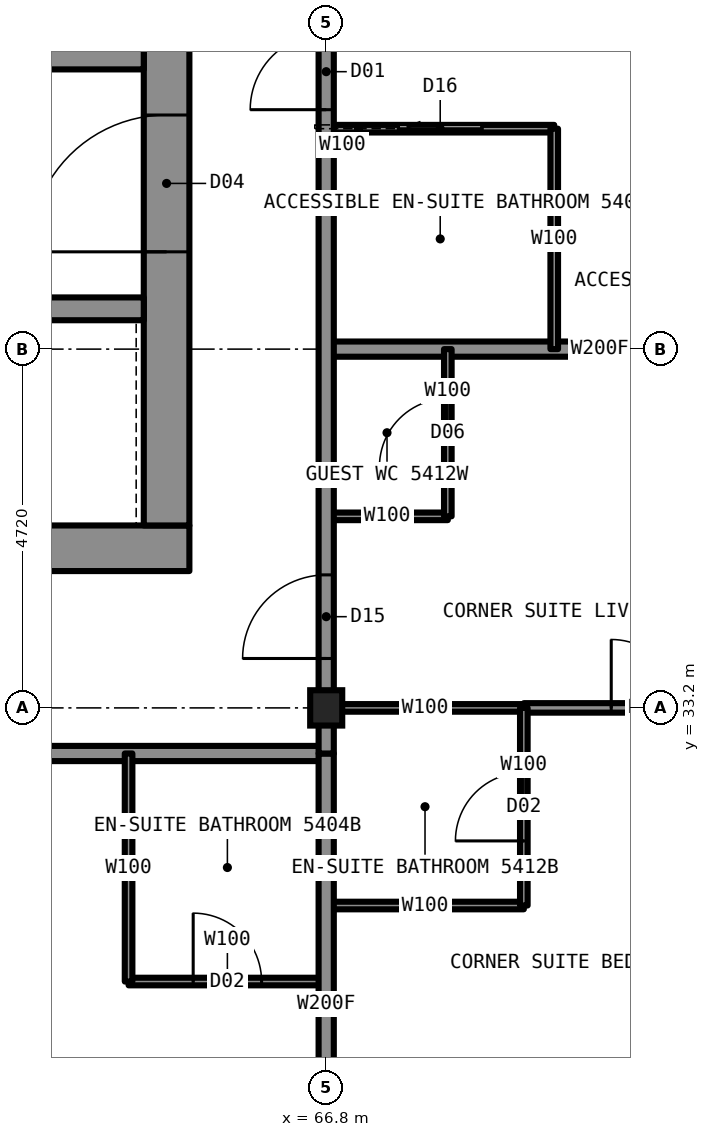
"""IFC4 building model, lengths in metres.
Left out: names, types, materials, properties, quantities, classifications, styles, units other than length and angle.
Written with IfcOpenShell. Run it as: python <this file> out.ifc"""

import sys

from ifc_helpers import new_model, si_unit, direction, frame, frame_2d, origin, origin_2d, place, context, subcontext, project, spatial, rectangle, i_section, extrude, element, fill, save


model = new_model("IFC4")
c1 = context("Model", 3, precision=1e-05, world=origin(), true_north=direction((0.0, 1.0)))
c2 = subcontext(c1, "Body", "Model", "MODEL_VIEW")
j1 = project(units=[si_unit("LENGTHUNIT", "METRE"), si_unit("PLANEANGLEUNIT", "RADIAN")], contexts=[c1])
p1 = place(None, origin())
s1 = spatial("IfcSite", under=j1, at=p1, CompositionType="ELEMENT")
p2 = place(p1, origin())
s2 = spatial("IfcBuilding", under=s1, at=p2, CompositionType="ELEMENT")
p3 = place(p2, frame((0.0, 0.0, 193.3)))
s3 = spatial("IfcBuildingStorey", under=s2, at=p3, CompositionType="ELEMENT", Elevation=193.3)
p4 = place(p3, frame((66.8, 33.2, 0.0), z_axis=(0.0, 0.0, 1.0), x_axis=(1.0, 0.0, 0.0)))
e1 = element("IfcColumn", 1, at=p4, inside=s3, PredefinedType="COLUMN", context=c2, shape_type="SweptSolid", body=[
    extrude(i_section(OverallWidth=0.422, OverallDepth=0.465, WebThickness=0.045, FlangeThickness=0.073, at=origin_2d()), origin(), (0.0, 0.0, 1.0), 3.5),
])
p5 = place(p3, frame((45.0, 35.3, 0.0), z_axis=(0.0, 0.0, 1.0), x_axis=(1.0, 0.0, 0.0)))
e2 = element("IfcWall", 2, at=p5, inside=s3, PredefinedType="SHEAR", context=c2, shape_type="SweptSolid", body=[
    extrude(rectangle(XDim=20.0, YDim=0.6, at=frame_2d((10.0, 0.0))), origin(), (0.0, 0.0, 1.0), 3.5),
])
p6 = place(p3, frame((64.7, 35.6, 0.0), z_axis=(0.0, 0.0, 1.0), x_axis=(0.0, 1.0, 0.0)))
e3 = element("IfcWall", 3, at=p6, inside=s3, PredefinedType="SHEAR", context=c2, shape_type="SweptSolid", body=[
    extrude(rectangle(XDim=18.8, YDim=0.6, at=frame_2d((9.4, 0.0))), origin(), (0.0, 0.0, 1.0), 3.5),
])
p7 = place(p6, frame((13.4, 0.0, 0.0)))
e4 = element("IfcOpeningElement", 4, at=p7, cuts=e3, PredefinedType="OPENING", context=c2, shape_type="SweptSolid", body=[
    extrude(rectangle(XDim=1.8, YDim=2.2, at=frame_2d((0.9, 1.1))), frame((0.0, 0.31, 0.0), z_axis=(0.0, -1.0, 0.0), x_axis=(1.0, 0.0, 0.0)), (0.0, 0.0, 1.0), 0.62),
])
p8 = place(p6, frame((3.6, 0.0, 0.0)))
e5 = element("IfcOpeningElement", 5, at=p8, cuts=e3, PredefinedType="OPENING", context=c2, shape_type="SweptSolid", body=[
    extrude(rectangle(XDim=1.8, YDim=2.2, at=frame_2d((0.9, 1.1))), frame((0.0, 0.31, 0.0), z_axis=(0.0, -1.0, 0.0), x_axis=(1.0, 0.0, 0.0)), (0.0, 0.0, 1.0), 0.62),
])
p9 = place(p3, frame((45.6, 38.45, 0.0), z_axis=(0.0, 0.0, 1.0), x_axis=(1.0, 0.0, 0.0)))
e6 = element("IfcWall", 6, at=p9, inside=s3, PredefinedType="SHEAR", context=c2, shape_type="SweptSolid", body=[
    extrude(rectangle(XDim=18.8, YDim=0.3, at=frame_2d((9.4, 0.0))), origin(), (0.0, 0.0, 1.0), 3.5),
])
p10 = place(p9, frame((0.7, 0.0, 0.0)))
e7 = element("IfcOpeningElement", 7, at=p10, cuts=e6, PredefinedType="OPENING", context=c2, shape_type="SweptSolid", body=[
    extrude(rectangle(XDim=1.1, YDim=2.2, at=frame_2d((0.55, 1.1))), frame((0.0, 0.16, 0.0), z_axis=(0.0, -1.0, 0.0), x_axis=(1.0, 0.0, 0.0)), (0.0, 0.0, 1.0), 0.32),
])
p11 = place(p9, frame((3.4, 0.0, 0.0)))
e8 = element("IfcOpeningElement", 8, at=p11, cuts=e6, PredefinedType="OPENING", context=c2, shape_type="SweptSolid", body=[
    extrude(rectangle(XDim=1.1, YDim=2.2, at=frame_2d((0.55, 1.1))), frame((0.0, 0.16, 0.0), z_axis=(0.0, -1.0, 0.0), x_axis=(1.0, 0.0, 0.0)), (0.0, 0.0, 1.0), 0.32),
])
p12 = place(p9, frame((6.1, 0.0, 0.0)))
e9 = element("IfcOpeningElement", 9, at=p12, cuts=e6, PredefinedType="OPENING", context=c2, shape_type="SweptSolid", body=[
    extrude(rectangle(XDim=1.1, YDim=2.2, at=frame_2d((0.55, 1.1))), frame((0.0, 0.16, 0.0), z_axis=(0.0, -1.0, 0.0), x_axis=(1.0, 0.0, 0.0)), (0.0, 0.0, 1.0), 0.32),
])
p13 = place(p9, frame((8.8, 0.0, 0.0)))
e10 = element("IfcOpeningElement", 10, at=p13, cuts=e6, PredefinedType="OPENING", context=c2, shape_type="SweptSolid", body=[
    extrude(rectangle(XDim=1.1, YDim=2.2, at=frame_2d((0.55, 1.1))), frame((0.0, 0.16, 0.0), z_axis=(0.0, -1.0, 0.0), x_axis=(1.0, 0.0, 0.0)), (0.0, 0.0, 1.0), 0.32),
])
p14 = place(p3, frame((56.2, 41.75, 0.0), z_axis=(0.0, 0.0, 1.0), x_axis=(1.0, 0.0, 0.0)))
e11 = element("IfcWall", 11, at=p14, inside=s3, PredefinedType="SHEAR", context=c2, shape_type="SweptSolid", body=[
    extrude(rectangle(XDim=8.2, YDim=0.3, at=frame_2d((4.1, 0.0))), origin(), (0.0, 0.0, 1.0), 3.5),
])
p15 = place(p14, frame((3.3, 0.0, 0.0)))
e12 = element("IfcOpeningElement", 12, at=p15, cuts=e11, PredefinedType="OPENING", context=c2, shape_type="SweptSolid", body=[
    extrude(rectangle(XDim=1.0, YDim=2.1, at=frame_2d((0.5, 1.05))), frame((0.0, 0.16, 0.0), z_axis=(0.0, -1.0, 0.0), x_axis=(1.0, 0.0, 0.0)), (0.0, 0.0, 1.0), 0.32),
])
p16 = place(p3, frame((66.8, 33.2, 0.0), z_axis=(0.0, 0.0, 1.0), x_axis=(1.0, 0.0, 0.0)))
e13 = element("IfcWall", 13, at=p16, inside=s3, PredefinedType="PARTITIONING", context=c2, shape_type="SweptSolid", body=[
    extrude(rectangle(XDim=2.6, YDim=0.1, at=frame_2d((1.3, 0.0))), origin(), (0.0, 0.0, 1.0), 2.573),
])
p17 = place(p3, frame((69.4, 33.2, 0.0), z_axis=(0.0, 0.0, 1.0), x_axis=(1.0, 0.0, 0.0)))
e14 = element("IfcWall", 14, at=p17, inside=s3, PredefinedType="PARTITIONING", context=c2, shape_type="SweptSolid", body=[
    extrude(rectangle(XDim=4.6, YDim=0.125, at=frame_2d((2.3, 0.0))), origin(), (0.0, 0.0, 1.0), 2.573),
])
p18 = place(p17, frame((1.15, 0.0, 0.0)))
e15 = element("IfcOpeningElement", 15, at=p18, cuts=e14, PredefinedType="OPENING", context=c2, shape_type="SweptSolid", body=[
    extrude(rectangle(XDim=0.9, YDim=2.2, at=frame_2d((0.45, 1.1))), frame((0.0, 0.073, 0.0), z_axis=(0.0, -1.0, 0.0), x_axis=(1.0, 0.0, 0.0)), (0.0, 0.0, 1.0), 0.145),
])
p19 = place(p3, frame((43.2, 32.6, 0.0), z_axis=(0.0, 0.0, 1.0), x_axis=(1.0, 0.0, 0.0)))
e16 = element("IfcWall", 16, at=p19, inside=s3, PredefinedType="PARTITIONING", context=c2, shape_type="SweptSolid", body=[
    extrude(rectangle(XDim=23.6, YDim=0.2, at=frame_2d((11.8, 0.0))), origin(), (0.0, 0.0, 1.0), 3.33),
])
p20 = place(p19, frame((3.0, 0.0, 0.0)))
e17 = element("IfcOpeningElement", 17, at=p20, cuts=e16, PredefinedType="OPENING", context=c2, shape_type="SweptSolid", body=[
    extrude(rectangle(XDim=1.0, YDim=2.2, at=frame_2d((0.5, 1.1))), frame((0.0, 0.11, 0.0), z_axis=(0.0, -1.0, 0.0), x_axis=(1.0, 0.0, 0.0)), (0.0, 0.0, 1.0), 0.22),
])
p21 = place(p19, frame((11.29, 0.0, 0.0)))
e18 = element("IfcOpeningElement", 18, at=p21, cuts=e16, PredefinedType="OPENING", context=c2, shape_type="SweptSolid", body=[
    extrude(rectangle(XDim=1.1, YDim=2.2, at=frame_2d((0.55, 1.1))), frame((0.0, 0.11, 0.0), z_axis=(0.0, -1.0, 0.0), x_axis=(1.0, 0.0, 0.0)), (0.0, 0.0, 1.0), 0.22),
])
p22 = place(p3, frame((66.8, 30.6, 0.0), z_axis=(0.0, 0.0, 1.0), x_axis=(1.0, 0.0, 0.0)))
e19 = element("IfcWall", 19, at=p22, inside=s3, PredefinedType="PARTITIONING", context=c2, shape_type="SweptSolid", body=[
    extrude(rectangle(XDim=2.6, YDim=0.1, at=frame_2d((1.3, 0.0))), origin(), (0.0, 0.0, 1.0), 3.33),
])
p23 = place(p3, frame((64.2, 29.6, 0.0), z_axis=(0.0, 0.0, 1.0), x_axis=(1.0, 0.0, 0.0)))
e20 = element("IfcWall", 20, at=p23, inside=s3, PredefinedType="PARTITIONING", context=c2, shape_type="SweptSolid", body=[
    extrude(rectangle(XDim=2.6, YDim=0.1, at=frame_2d((1.3, 0.0))), origin(), (0.0, 0.0, 1.0), 3.33),
])
p24 = place(p23, frame((0.85, 0.0, 0.0)))
e21 = element("IfcOpeningElement", 21, at=p24, cuts=e20, PredefinedType="OPENING", context=c2, shape_type="SweptSolid", body=[
    extrude(rectangle(XDim=0.9, YDim=2.1, at=frame_2d((0.45, 1.05))), frame((0.0, 0.06, 0.0), z_axis=(0.0, -1.0, 0.0), x_axis=(1.0, 0.0, 0.0)), (0.0, 0.0, 1.0), 0.12),
])
p25 = place(p3, frame((66.8, 40.82, 0.0), z_axis=(0.0, 0.0, 1.0), x_axis=(1.0, 0.0, 0.0)))
e22 = element("IfcWall", 22, at=p25, inside=s3, PredefinedType="PARTITIONING", context=c2, shape_type="SweptSolid", body=[
    extrude(rectangle(XDim=3.0, YDim=0.1, at=frame_2d((1.5, 0.0))), origin(), (0.0, 0.0, 1.0), 3.33),
])
p26 = place(p25, frame((0.95, 0.0, 0.0)))
e23 = element("IfcOpeningElement", 23, at=p26, cuts=e22, PredefinedType="OPENING", context=c2, shape_type="SweptSolid", body=[
    extrude(rectangle(XDim=1.1, YDim=2.1, at=frame_2d((0.55, 1.05))), frame((0.0, 0.06, 0.0), z_axis=(0.0, -1.0, 0.0), x_axis=(1.0, 0.0, 0.0)), (0.0, 0.0, 1.0), 0.12),
])
p27 = place(p3, frame((66.8, 37.92, 0.0), z_axis=(0.0, 0.0, 1.0), x_axis=(1.0, 0.0, 0.0)))
e24 = element("IfcWall", 24, at=p27, inside=s3, PredefinedType="PARTITIONING", context=c2, shape_type="SweptSolid", body=[
    extrude(rectangle(XDim=7.2, YDim=0.2, at=frame_2d((3.6, 0.0))), origin(), (0.0, 0.0, 1.0), 2.573),
])
p28 = place(p3, frame((66.8, 35.72, 0.0), z_axis=(0.0, 0.0, 1.0), x_axis=(1.0, 0.0, 0.0)))
e25 = element("IfcWall", 25, at=p28, inside=s3, PredefinedType="PARTITIONING", context=c2, shape_type="SweptSolid", body=[
    extrude(rectangle(XDim=1.6, YDim=0.1, at=frame_2d((0.8, 0.0))), origin(), (0.0, 0.0, 1.0), 3.33),
])
p29 = place(p3, frame((66.8, 33.22, 0.0), z_axis=(0.0, 0.0, 1.0), x_axis=(0.0, 1.0, 0.0)))
e26 = element("IfcWall", 26, at=p29, inside=s3, PredefinedType="PARTITIONING", context=c2, shape_type="SweptSolid", body=[
    extrude(rectangle(XDim=23.56, YDim=0.2, at=frame_2d((11.78, 0.0))), origin(), (0.0, 0.0, 1.0), 3.33),
])
p30 = place(p29, frame((7.85, 0.0, 0.0)))
e27 = element("IfcOpeningElement", 27, at=p30, cuts=e26, PredefinedType="OPENING", context=c2, shape_type="SweptSolid", body=[
    extrude(rectangle(XDim=1.0, YDim=2.2, at=frame_2d((0.5, 1.1))), frame((0.0, 0.11, 0.0), z_axis=(0.0, -1.0, 0.0), x_axis=(1.0, 0.0, 0.0)), (0.0, 0.0, 1.0), 0.22),
])
p31 = place(p29, frame((12.42, 0.0, 0.0)))
e28 = element("IfcOpeningElement", 28, at=p31, cuts=e26, PredefinedType="OPENING", context=c2, shape_type="SweptSolid", body=[
    extrude(rectangle(XDim=1.0, YDim=2.2, at=frame_2d((0.5, 1.1))), frame((0.0, 0.11, 0.0), z_axis=(0.0, -1.0, 0.0), x_axis=(1.0, 0.0, 0.0)), (0.0, 0.0, 1.0), 0.22),
])
p32 = place(p29, frame((22.03, 0.0, 0.0)))
e29 = element("IfcOpeningElement", 29, at=p32, cuts=e26, PredefinedType="OPENING", context=c2, shape_type="SweptSolid", body=[
    extrude(rectangle(XDim=1.1, YDim=2.2, at=frame_2d((0.55, 1.1))), frame((0.0, 0.11, 0.0), z_axis=(0.0, -1.0, 0.0), x_axis=(1.0, 0.0, 0.0)), (0.0, 0.0, 1.0), 0.22),
])
p33 = place(p29, frame((0.63, 0.0, 0.0)))
e30 = element("IfcOpeningElement", 30, at=p33, cuts=e26, PredefinedType="OPENING", context=c2, shape_type="SweptSolid", body=[
    extrude(rectangle(XDim=1.1, YDim=2.2, at=frame_2d((0.55, 1.1))), frame((0.0, 0.11, 0.0), z_axis=(0.0, -1.0, 0.0), x_axis=(1.0, 0.0, 0.0)), (0.0, 0.0, 1.0), 0.22),
])
p34 = place(p3, frame((66.8, 26.0, 0.0), z_axis=(0.0, 0.0, 1.0), x_axis=(0.0, 1.0, 0.0)))
e31 = element("IfcWall", 31, at=p34, inside=s3, PredefinedType="PARTITIONING", context=c2, shape_type="SweptSolid", body=[
    extrude(rectangle(XDim=6.6, YDim=0.2, at=frame_2d((3.3, 0.0))), origin(), (0.0, 0.0, 1.0), 2.573),
])
p35 = place(p3, frame((68.4, 35.72, 0.0), z_axis=(0.0, 0.0, 1.0), x_axis=(0.0, 1.0, 0.0)))
e32 = element("IfcWall", 32, at=p35, inside=s3, PredefinedType="PARTITIONING", context=c2, shape_type="SweptSolid", body=[
    extrude(rectangle(XDim=2.2, YDim=0.1, at=frame_2d((1.1, 0.0))), origin(), (0.0, 0.0, 1.0), 3.33),
])
p36 = place(p35, frame((0.65, 0.0, 0.0)))
e33 = element("IfcOpeningElement", 33, at=p36, cuts=e32, PredefinedType="OPENING", context=c2, shape_type="SweptSolid", body=[
    extrude(rectangle(XDim=0.9, YDim=2.1, at=frame_2d((0.45, 1.05))), frame((0.0, 0.06, 0.0), z_axis=(0.0, -1.0, 0.0), x_axis=(1.0, 0.0, 0.0)), (0.0, 0.0, 1.0), 0.12),
])
p37 = place(p3, frame((69.4, 30.6, 0.0), z_axis=(0.0, 0.0, 1.0), x_axis=(0.0, 1.0, 0.0)))
e34 = element("IfcWall", 34, at=p37, inside=s3, PredefinedType="PARTITIONING", context=c2, shape_type="SweptSolid", body=[
    extrude(rectangle(XDim=2.6, YDim=0.1, at=frame_2d((1.3, 0.0))), origin(), (0.0, 0.0, 1.0), 3.33),
])
p38 = place(p37, frame((0.85, 0.0, 0.0)))
e35 = element("IfcOpeningElement", 35, at=p38, cuts=e34, PredefinedType="OPENING", context=c2, shape_type="SweptSolid", body=[
    extrude(rectangle(XDim=0.9, YDim=2.1, at=frame_2d((0.45, 1.05))), frame((0.0, 0.06, 0.0), z_axis=(0.0, -1.0, 0.0), x_axis=(1.0, 0.0, 0.0)), (0.0, 0.0, 1.0), 0.12),
])
p39 = place(p3, frame((69.8, 37.92, 0.0), z_axis=(0.0, 0.0, 1.0), x_axis=(0.0, 1.0, 0.0)))
e36 = element("IfcWall", 36, at=p39, inside=s3, PredefinedType="PARTITIONING", context=c2, shape_type="SweptSolid", body=[
    extrude(rectangle(XDim=2.9, YDim=0.1, at=frame_2d((1.45, 0.0))), origin(), (0.0, 0.0, 1.0), 3.33),
])
p40 = place(p3, frame((64.2, 29.6, 0.0), z_axis=(0.0, 0.0, 1.0), x_axis=(0.0, 1.0, 0.0)))
e37 = element("IfcWall", 37, at=p40, inside=s3, PredefinedType="PARTITIONING", context=c2, shape_type="SweptSolid", body=[
    extrude(rectangle(XDim=3.0, YDim=0.1, at=frame_2d((1.5, 0.0))), origin(), (0.0, 0.0, 1.0), 3.33),
])
p41 = place(p3, frame((66.8, 32.6, 0.0), z_axis=(0.0, 0.0, 1.0), x_axis=(0.0, 1.0, 0.0)))
e38 = element("IfcWall", 38, at=p41, inside=s3, PredefinedType="PARTITIONING", context=c2, shape_type="SweptSolid", body=[
    extrude(rectangle(XDim=0.62, YDim=0.2, at=frame_2d((0.31, 0.0))), origin(), (0.0, 0.0, 1.0), 2.573),
])
p42 = place(p24, origin())
e39 = element("IfcDoor", 39, at=p42, inside=s3, OperationType="SINGLE_SWING_RIGHT", PredefinedType="DOOR", context=c2, shape_type="SweptSolid", body=[
    extrude(rectangle(XDim=0.9, YDim=2.1, at=frame_2d((0.45, 1.05))), frame((0.0, 0.025, 0.0), z_axis=(0.0, -1.0, 0.0), x_axis=(1.0, 0.0, 0.0)), (0.0, 0.0, 1.0), 0.05),
])
fill(e21, e39)
p43 = place(p30, origin())
e40 = element("IfcDoor", 40, at=p43, inside=s3, OperationType="SINGLE_SWING_LEFT", PredefinedType="DOOR", context=c2, shape_type="SweptSolid", body=[
    extrude(rectangle(XDim=1.0, YDim=2.2, at=frame_2d((0.5, 1.1))), frame((0.0, 0.025, 0.0), z_axis=(0.0, -1.0, 0.0), x_axis=(1.0, 0.0, 0.0)), (0.0, 0.0, 1.0), 0.05),
])
fill(e27, e40)
p44 = place(p26, origin())
e41 = element("IfcDoor", 41, at=p44, inside=s3, OperationType="SLIDING_TO_LEFT", PredefinedType="DOOR", context=c2, shape_type="SweptSolid", body=[
    extrude(rectangle(XDim=1.1, YDim=2.1, at=frame_2d((0.55, 1.05))), frame((0.0, 0.025, 0.0), z_axis=(0.0, -1.0, 0.0), x_axis=(1.0, 0.0, 0.0)), (0.0, 0.0, 1.0), 0.05),
])
fill(e23, e41)
p45 = place(p33, origin())
e42 = element("IfcDoor", 42, at=p45, inside=s3, OperationType="SINGLE_SWING_LEFT", PredefinedType="DOOR", context=c2, shape_type="SweptSolid", body=[
    extrude(rectangle(XDim=1.1, YDim=2.2, at=frame_2d((0.55, 1.1))), frame((0.0, 0.025, 0.0), z_axis=(0.0, -1.0, 0.0), x_axis=(1.0, 0.0, 0.0)), (0.0, 0.0, 1.0), 0.05),
])
fill(e30, e42)
p46 = place(p38, origin())
e43 = element("IfcDoor", 43, at=p46, inside=s3, OperationType="SINGLE_SWING_RIGHT", PredefinedType="DOOR", context=c2, shape_type="SweptSolid", body=[
    extrude(rectangle(XDim=0.9, YDim=2.1, at=frame_2d((0.45, 1.05))), frame((0.0, 0.025, 0.0), z_axis=(0.0, -1.0, 0.0), x_axis=(1.0, 0.0, 0.0)), (0.0, 0.0, 1.0), 0.05),
])
fill(e35, e43)
p47 = place(p18, origin())
e44 = element("IfcDoor", 44, at=p47, inside=s3, OperationType="SINGLE_SWING_LEFT", PredefinedType="DOOR", context=c2, shape_type="SweptSolid", body=[
    extrude(rectangle(XDim=0.9, YDim=2.2, at=frame_2d((0.45, 1.1))), frame((0.0, 0.025, 0.0), z_axis=(0.0, -1.0, 0.0), x_axis=(1.0, 0.0, 0.0)), (0.0, 0.0, 1.0), 0.05),
])
fill(e15, e44)
p48 = place(p36, origin())
e45 = element("IfcDoor", 45, at=p48, inside=s3, OperationType="SINGLE_SWING_LEFT", PredefinedType="DOOR", context=c2, shape_type="SweptSolid", body=[
    extrude(rectangle(XDim=0.9, YDim=2.1, at=frame_2d((0.45, 1.05))), frame((0.0, 0.025, 0.0), z_axis=(0.0, -1.0, 0.0), x_axis=(1.0, 0.0, 0.0)), (0.0, 0.0, 1.0), 0.05),
])
fill(e33, e45)
p49 = place(p8, origin())
e46 = element("IfcDoor", 46, at=p49, inside=s3, OperationType="DOUBLE_DOOR_SINGLE_SWING", PredefinedType="DOOR", context=c2, shape_type="SweptSolid", body=[
    extrude(rectangle(XDim=1.8, YDim=2.2, at=frame_2d((0.9, 1.1))), frame((0.0, 0.025, 0.0), z_axis=(0.0, -1.0, 0.0), x_axis=(1.0, 0.0, 0.0)), (0.0, 0.0, 1.0), 0.05),
])
fill(e5, e46)
save(model, sys.argv[1])
